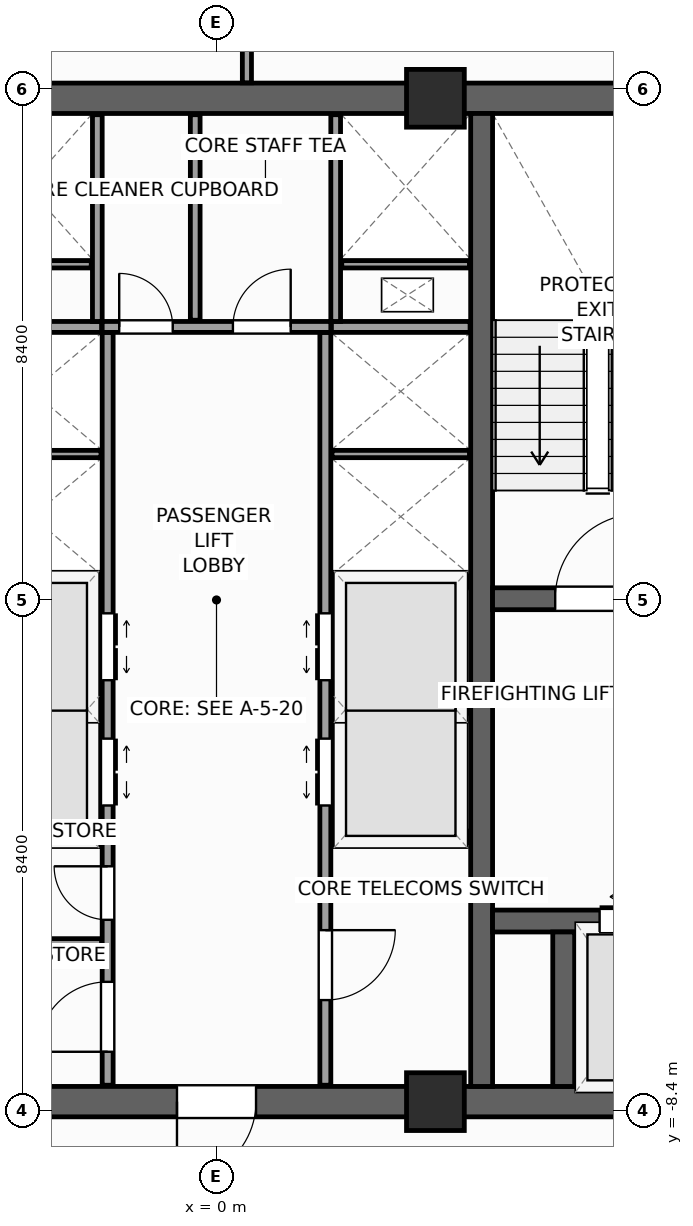
"""IFC4 building model, lengths in metres.
Left out: names, types, materials, properties, quantities, classifications, styles, units other than length and angle.
Written with IfcOpenShell. Run it as: python <this file> out.ifc"""

import sys

from ifc_helpers import new_model, si_unit, direction, frame, frame_2d, origin, origin_2d, place, context, subcontext, project, spatial, rectangle, extrude, source, transform, mapped, element, fill, save


model = new_model("IFC4")
c1 = context("Model", 3, precision=1e-05, world=origin(), true_north=direction((0.0, 1.0)))
c2 = subcontext(c1, "Body", "Model", "MODEL_VIEW")
j1 = project(units=[si_unit("LENGTHUNIT", "METRE"), si_unit("PLANEANGLEUNIT", "RADIAN")], contexts=[c1])
p1 = place(None, origin())
s1 = spatial("IfcSite", under=j1, at=p1, CompositionType="ELEMENT")
p2 = place(p1, origin())
s2 = spatial("IfcBuilding", under=s1, at=p2, CompositionType="ELEMENT")
p3 = place(p2, frame((0.0, 0.0, 209.5)))
s3 = spatial("IfcBuildingStorey", under=s2, at=p3, CompositionType="ELEMENT", Elevation=209.5)
p4 = place(p3, frame((-8.5, -8.25, 0.0), z_axis=(0.0, 0.0, 1.0), x_axis=(1.0, 0.0, 0.0)))
e1 = element("IfcWall", 1, at=p4, inside=s3, PredefinedType="SHEAR", context=c2, shape_type="SweptSolid", body=[
    extrude(rectangle(XDim=17.0, YDim=0.5, at=frame_2d((8.5, 0.0))), origin(), (0.0, 0.0, 1.0), 3.9),
])
p5 = place(p4, frame((7.85, 0.0, 0.0)))
e2 = element("IfcOpeningElement", 2, at=p5, cuts=e1, PredefinedType="OPENING", context=c2, shape_type="SweptSolid", body=[
    extrude(rectangle(XDim=1.3, YDim=2.2, at=frame_2d((0.65, 1.1))), frame((0.0, 0.26, 0.0), z_axis=(0.0, -1.0, 0.0), x_axis=(1.0, 0.0, 0.0)), (0.0, 0.0, 1.0), 0.52),
])
p6 = place(p3, frame((-8.5, 8.25, 0.0), z_axis=(0.0, 0.0, 1.0), x_axis=(1.0, 0.0, 0.0)))
e3 = element("IfcWall", 3, at=p6, inside=s3, PredefinedType="SHEAR", context=c2, shape_type="SweptSolid", body=[
    extrude(rectangle(XDim=17.0, YDim=0.5, at=frame_2d((8.5, 0.0))), origin(), (0.0, 0.0, 1.0), 3.9),
])
p7 = place(p3, frame((4.36, -8.0, 0.0), z_axis=(0.0, 0.0, 1.0), x_axis=(0.0, 1.0, 0.0)))
e4 = element("IfcWall", 4, at=p7, inside=s3, PredefinedType="SHEAR", context=c2, shape_type="SweptSolid", body=[
    extrude(rectangle(XDim=16.0, YDim=0.36, at=frame_2d((8.0, 0.0))), origin(), (0.0, 0.0, 1.0), 3.9),
])
p8 = place(p3, frame((4.54, 0.02, 0.0), z_axis=(0.0, 0.0, 1.0), x_axis=(1.0, 0.0, 0.0)))
e5 = element("IfcWall", 5, at=p8, inside=s3, PredefinedType="SHEAR", context=c2, shape_type="SweptSolid", body=[
    extrude(rectangle(XDim=3.46, YDim=0.36, at=frame_2d((1.73, 0.0))), origin(), (0.0, 0.0, 1.0), 3.9),
])
p9 = place(p8, frame((1.03, 0.0, 0.0)))
e6 = element("IfcOpeningElement", 6, at=p9, cuts=e5, PredefinedType="OPENING", context=c2, shape_type="SweptSolid", body=[
    extrude(rectangle(XDim=1.4, YDim=2.2, at=frame_2d((0.7, 1.1))), frame((0.0, 0.19, 0.0), z_axis=(0.0, -1.0, 0.0), x_axis=(1.0, 0.0, 0.0)), (0.0, 0.0, 1.0), 0.38),
])
p10 = place(p3, frame((4.54, -5.28, 0.0), z_axis=(0.0, 0.0, 1.0), x_axis=(1.0, 0.0, 0.0)))
e7 = element("IfcWall", 7, at=p10, inside=s3, PredefinedType="SHEAR", context=c2, shape_type="SweptSolid", body=[
    extrude(rectangle(XDim=3.46, YDim=0.36, at=frame_2d((1.73, 0.0))), origin(), (0.0, 0.0, 1.0), 3.9),
])
p11 = place(p10, frame((1.76, 0.0, 0.0)))
e8 = element("IfcOpeningElement", 8, at=p11, cuts=e7, PredefinedType="OPENING", context=c2, shape_type="SweptSolid", body=[
    extrude(rectangle(XDim=1.2, YDim=2.25, at=frame_2d((0.6, 1.125))), frame((0.0, 0.19, 0.0), z_axis=(0.0, -1.0, 0.0), x_axis=(1.0, 0.0, 0.0)), (0.0, 0.0, 1.0), 0.38),
])
p12 = place(p3, frame((5.71, -8.0, 0.0), z_axis=(0.0, 0.0, 1.0), x_axis=(0.0, 1.0, 0.0)))
e9 = element("IfcWall", 9, at=p12, inside=s3, PredefinedType="SHEAR", context=c2, shape_type="SweptSolid", body=[
    extrude(rectangle(XDim=2.54, YDim=0.36, at=frame_2d((1.27, 0.0))), origin(), (0.0, 0.0, 1.0), 3.9),
])
m1 = source(origin(), c2, "Body", "SweptSolid", [
    extrude(rectangle(XDim=0.95, YDim=0.95, at=origin_2d()), origin(), (0.0, 0.0, 1.0), 3.9),
])
for number, where, z_axis, x_axis in (
    (10, (3.6, -8.25, 0.0), (0.0, 0.0, 1.0), (1.0, 0.0, 0.0)),
    (11, (3.6, 8.25, 0.0), (0.0, 0.0, 1.0), (1.0, 0.0, 0.0)),
):
    element("IfcColumn", number, at=place(p3, frame(where, z_axis=z_axis, x_axis=x_axis)), inside=s3, PredefinedType="PILASTER", context=c2, shape_type="MappedRepresentation", body=[
        mapped(m1, transform((0.0, 0.0, 0.0), scale=1.0)),
    ])
p13 = place(p3, frame((29.154, 6.733, 0.0), z_axis=(0.0, 0.0, 1.0), x_axis=(-0.77714192302, 0.629325378072, 0.0)))
e12 = element("IfcWall", 12, at=p13, inside=s3, PredefinedType="STANDARD", context=c2, shape_type="SweptSolid", body=[
    extrude(rectangle(XDim=36.84, YDim=0.34, at=frame_2d((18.42, 0.0))), origin(), (0.0, 0.0, 1.0), 2.96),
])
p14 = place(p13, frame((3.721, 0.0, 0.48)))
e13 = element("IfcOpeningElement", 13, at=p14, cuts=e12, PredefinedType="OPENING", context=c2, shape_type="SweptSolid", body=[
    extrude(rectangle(XDim=1.4, YDim=2.4, at=frame_2d((0.7, 1.2))), frame((0.0, 0.18, 0.0), z_axis=(0.0, -1.0, 0.0), x_axis=(1.0, 0.0, 0.0)), (0.0, 0.0, 1.0), 0.36),
])
p15 = place(p13, frame((9.809, 0.0, 0.58)))
e14 = element("IfcOpeningElement", 14, at=p15, cuts=e12, PredefinedType="OPENING", context=c2, shape_type="SweptSolid", body=[
    extrude(rectangle(XDim=1.75, YDim=2.3, at=frame_2d((0.875, 1.15))), frame((0.0, 0.18, 0.0), z_axis=(0.0, -1.0, 0.0), x_axis=(1.0, 0.0, 0.0)), (0.0, 0.0, 1.0), 0.36),
])
p16 = place(p13, frame((16.058, 0.0, 0.58)))
e15 = element("IfcOpeningElement", 15, at=p16, cuts=e12, PredefinedType="OPENING", context=c2, shape_type="SweptSolid", body=[
    extrude(rectangle(XDim=1.75, YDim=2.3, at=frame_2d((0.875, 1.15))), frame((0.0, 0.18, 0.0), z_axis=(0.0, -1.0, 0.0), x_axis=(1.0, 0.0, 0.0)), (0.0, 0.0, 1.0), 0.36),
])
p17 = place(p13, frame((24.176, 0.0, 0.58)))
e16 = element("IfcOpeningElement", 16, at=p17, cuts=e12, PredefinedType="OPENING", context=c2, shape_type="SweptSolid", body=[
    extrude(rectangle(XDim=1.75, YDim=2.3, at=frame_2d((0.875, 1.15))), frame((0.0, 0.18, 0.0), z_axis=(0.0, -1.0, 0.0), x_axis=(1.0, 0.0, 0.0)), (0.0, 0.0, 1.0), 0.36),
])
p18 = place(p13, frame((30.982, 0.0, 0.48)))
e17 = element("IfcOpeningElement", 17, at=p18, cuts=e12, PredefinedType="OPENING", context=c2, shape_type="SweptSolid", body=[
    extrude(rectangle(XDim=1.4, YDim=2.4, at=frame_2d((0.7, 1.2))), frame((0.0, 0.18, 0.0), z_axis=(0.0, -1.0, 0.0), x_axis=(1.0, 0.0, 0.0)), (0.0, 0.0, 1.0), 0.36),
])
p19 = place(p3, frame((-29.154, -6.733, 0.0), z_axis=(0.0, 0.0, 1.0), x_axis=(0.77714192302, -0.629325378072, 0.0)))
e18 = element("IfcWall", 18, at=p19, inside=s3, PredefinedType="STANDARD", context=c2, shape_type="SweptSolid", body=[
    extrude(rectangle(XDim=36.84, YDim=0.34, at=frame_2d((18.42, 0.0))), origin(), (0.0, 0.0, 1.0), 2.96),
])
p20 = place(p19, frame((3.721, 0.0, 0.48)))
e19 = element("IfcOpeningElement", 19, at=p20, cuts=e18, PredefinedType="OPENING", context=c2, shape_type="SweptSolid", body=[
    extrude(rectangle(XDim=1.4, YDim=2.4, at=frame_2d((0.7, 1.2))), frame((0.0, 0.18, 0.0), z_axis=(0.0, -1.0, 0.0), x_axis=(1.0, 0.0, 0.0)), (0.0, 0.0, 1.0), 0.36),
])
p21 = place(p19, frame((9.809, 0.0, 0.58)))
e20 = element("IfcOpeningElement", 20, at=p21, cuts=e18, PredefinedType="OPENING", context=c2, shape_type="SweptSolid", body=[
    extrude(rectangle(XDim=1.75, YDim=2.3, at=frame_2d((0.875, 1.15))), frame((0.0, 0.18, 0.0), z_axis=(0.0, -1.0, 0.0), x_axis=(1.0, 0.0, 0.0)), (0.0, 0.0, 1.0), 0.36),
])
p22 = place(p19, frame((16.058, 0.0, 0.58)))
e21 = element("IfcOpeningElement", 21, at=p22, cuts=e18, PredefinedType="OPENING", context=c2, shape_type="SweptSolid", body=[
    extrude(rectangle(XDim=1.75, YDim=2.3, at=frame_2d((0.875, 1.15))), frame((0.0, 0.18, 0.0), z_axis=(0.0, -1.0, 0.0), x_axis=(1.0, 0.0, 0.0)), (0.0, 0.0, 1.0), 0.36),
])
p23 = place(p19, frame((24.176, 0.0, 0.58)))
e22 = element("IfcOpeningElement", 22, at=p23, cuts=e18, PredefinedType="OPENING", context=c2, shape_type="SweptSolid", body=[
    extrude(rectangle(XDim=1.75, YDim=2.3, at=frame_2d((0.875, 1.15))), frame((0.0, 0.18, 0.0), z_axis=(0.0, -1.0, 0.0), x_axis=(1.0, 0.0, 0.0)), (0.0, 0.0, 1.0), 0.36),
])
p24 = place(p19, frame((30.982, 0.0, 0.48)))
e23 = element("IfcOpeningElement", 23, at=p24, cuts=e18, PredefinedType="OPENING", context=c2, shape_type="SweptSolid", body=[
    extrude(rectangle(XDim=1.4, YDim=2.4, at=frame_2d((0.7, 1.2))), frame((0.0, 0.18, 0.0), z_axis=(0.0, -1.0, 0.0), x_axis=(1.0, 0.0, 0.0)), (0.0, 0.0, 1.0), 0.36),
])
p25 = place(p3, frame((-1.79, -7.98, 0.0), z_axis=(0.0, 0.0, 1.0), x_axis=(0.0, 1.0, 0.0)))
e24 = element("IfcWall", 24, at=p25, inside=s3, PredefinedType="PARTITIONING", context=c2, shape_type="SweptSolid", body=[
    extrude(rectangle(XDim=12.38, YDim=0.18, at=frame_2d((6.19, 0.0))), origin(), (0.0, 0.0, 1.0), 3.66),
])
p26 = place(p25, frame((4.6, 0.0, 0.0)))
e25 = element("IfcOpeningElement", 25, at=p26, cuts=e24, PredefinedType="OPENING", context=c2, shape_type="SweptSolid", body=[
    extrude(rectangle(XDim=1.1, YDim=2.2, at=frame_2d((0.55, 1.1))), frame((0.0, 0.1, 0.0), z_axis=(0.0, -1.0, 0.0), x_axis=(1.0, 0.0, 0.0)), (0.0, 0.0, 1.0), 0.2),
])
p27 = place(p25, frame((6.66, 0.0, 0.0)))
e26 = element("IfcOpeningElement", 26, at=p27, cuts=e24, PredefinedType="OPENING", context=c2, shape_type="SweptSolid", body=[
    extrude(rectangle(XDim=1.1, YDim=2.2, at=frame_2d((0.55, 1.1))), frame((0.0, 0.1, 0.0), z_axis=(0.0, -1.0, 0.0), x_axis=(1.0, 0.0, 0.0)), (0.0, 0.0, 1.0), 0.2),
])
p28 = place(p25, frame((0.55, 0.0, 0.0)))
e27 = element("IfcOpeningElement", 27, at=p28, cuts=e24, PredefinedType="OPENING", context=c2, shape_type="SweptSolid", body=[
    extrude(rectangle(XDim=1.15, YDim=2.25, at=frame_2d((0.575, 1.125))), frame((0.0, 0.1, 0.0), z_axis=(0.0, -1.0, 0.0), x_axis=(1.0, 0.0, 0.0)), (0.0, 0.0, 1.0), 0.2),
])
p29 = place(p25, frame((2.72, 0.0, 0.0)))
e28 = element("IfcOpeningElement", 28, at=p29, cuts=e24, PredefinedType="OPENING", context=c2, shape_type="SweptSolid", body=[
    extrude(rectangle(XDim=0.88, YDim=2.1, at=frame_2d((0.44, 1.05))), frame((0.0, 0.1, 0.0), z_axis=(0.0, -1.0, 0.0), x_axis=(1.0, 0.0, 0.0)), (0.0, 0.0, 1.0), 0.2),
])
p30 = place(p3, frame((1.79, -7.98, 0.0), z_axis=(0.0, 0.0, 1.0), x_axis=(0.0, 1.0, 0.0)))
e29 = element("IfcWall", 29, at=p30, inside=s3, PredefinedType="PARTITIONING", context=c2, shape_type="SweptSolid", body=[
    extrude(rectangle(XDim=12.38, YDim=0.18, at=frame_2d((6.19, 0.0))), origin(), (0.0, 0.0, 1.0), 3.66),
])
p31 = place(p30, frame((4.6, 0.0, 0.0)))
e30 = element("IfcOpeningElement", 30, at=p31, cuts=e29, PredefinedType="OPENING", context=c2, shape_type="SweptSolid", body=[
    extrude(rectangle(XDim=1.1, YDim=2.2, at=frame_2d((0.55, 1.1))), frame((0.0, 0.1, 0.0), z_axis=(0.0, -1.0, 0.0), x_axis=(1.0, 0.0, 0.0)), (0.0, 0.0, 1.0), 0.2),
])
p32 = place(p30, frame((6.66, 0.0, 0.0)))
e31 = element("IfcOpeningElement", 31, at=p32, cuts=e29, PredefinedType="OPENING", context=c2, shape_type="SweptSolid", body=[
    extrude(rectangle(XDim=1.1, YDim=2.2, at=frame_2d((0.55, 1.1))), frame((0.0, 0.1, 0.0), z_axis=(0.0, -1.0, 0.0), x_axis=(1.0, 0.0, 0.0)), (0.0, 0.0, 1.0), 0.2),
])
p33 = place(p30, frame((1.4, 0.0, 0.0)))
e32 = element("IfcOpeningElement", 32, at=p33, cuts=e29, PredefinedType="OPENING", context=c2, shape_type="SweptSolid", body=[
    extrude(rectangle(XDim=1.15, YDim=2.25, at=frame_2d((0.575, 1.125))), frame((0.0, 0.1, 0.0), z_axis=(0.0, -1.0, 0.0), x_axis=(1.0, 0.0, 0.0)), (0.0, 0.0, 1.0), 0.2),
])
p34 = place(p3, frame((-1.88, 4.49, 0.0), z_axis=(0.0, 0.0, 1.0), x_axis=(1.0, 0.0, 0.0)))
e33 = element("IfcWall", 33, at=p34, inside=s3, PredefinedType="PARTITIONING", context=c2, shape_type="SweptSolid", body=[
    extrude(rectangle(XDim=3.76, YDim=0.18, at=frame_2d((1.88, 0.0))), origin(), (0.0, 0.0, 1.0), 3.66),
])
p35 = place(p34, frame((0.28, 0.0, 0.0)))
e34 = element("IfcOpeningElement", 34, at=p35, cuts=e33, PredefinedType="OPENING", context=c2, shape_type="SweptSolid", body=[
    extrude(rectangle(XDim=0.88, YDim=2.1, at=frame_2d((0.44, 1.05))), frame((0.0, 0.1, 0.0), z_axis=(0.0, -1.0, 0.0), x_axis=(1.0, 0.0, 0.0)), (0.0, 0.0, 1.0), 0.2),
])
p36 = place(p34, frame((2.15, 0.0, 0.0)))
e35 = element("IfcOpeningElement", 35, at=p36, cuts=e33, PredefinedType="OPENING", context=c2, shape_type="SweptSolid", body=[
    extrude(rectangle(XDim=0.95, YDim=2.1, at=frame_2d((0.475, 1.05))), frame((0.0, 0.1, 0.0), z_axis=(0.0, -1.0, 0.0), x_axis=(1.0, 0.0, 0.0)), (0.0, 0.0, 1.0), 0.2),
])
for number, where, z_axis, x_axis in (
    (36, (-4.17, -3.9, 0.0), (0.0, 0.0, 1.0), (1.0, 0.0, 0.0)),
    (37, (1.89, -3.9, 0.0), (0.0, 0.0, 1.0), (1.0, 0.0, 0.0)),
    (38, (-4.17, 0.3, 0.0), (0.0, 0.0, 1.0), (1.0, 0.0, 0.0)),
    (39, (1.89, 0.3, 0.0), (0.0, 0.0, 1.0), (1.0, 0.0, 0.0)),
    (40, (-4.17, 4.49, 0.0), (0.0, 0.0, 1.0), (1.0, 0.0, 0.0)),
    (41, (1.89, 4.49, 0.0), (0.0, 0.0, 1.0), (1.0, 0.0, 0.0)),
):
    element("IfcWall", number, at=place(p3, frame(where, z_axis=z_axis, x_axis=x_axis)), inside=s3, PredefinedType="PARTITIONING", context=c2, shape_type="SweptSolid", body=[
        extrude(rectangle(XDim=2.28, YDim=0.18, at=frame_2d((1.14, 0.0))), origin(), (0.0, 0.0, 1.0), 3.66),
    ])
for number, where, z_axis, x_axis in (
    (42, (-4.16, -1.8, 0.0), (0.0, 0.0, 1.0), (1.0, 0.0, 0.0)),
    (43, (1.9, -1.8, 0.0), (0.0, 0.0, 1.0), (1.0, 0.0, 0.0)),
    (44, (-4.16, 2.4, 0.0), (0.0, 0.0, 1.0), (1.0, 0.0, 0.0)),
    (45, (1.9, 2.4, 0.0), (0.0, 0.0, 1.0), (1.0, 0.0, 0.0)),
):
    element("IfcWall", number, at=place(p3, frame(where, z_axis=z_axis, x_axis=x_axis)), inside=s3, PredefinedType="PARTITIONING", context=c2, shape_type="SweptSolid", body=[
        extrude(rectangle(XDim=2.26, YDim=0.12, at=frame_2d((1.13, 0.0))), origin(), (0.0, 0.0, 1.0), 3.66),
    ])
p37 = place(p3, frame((-4.17, -5.65, 0.0), z_axis=(0.0, 0.0, 1.0), x_axis=(1.0, 0.0, 0.0)))
e46 = element("IfcWall", 46, at=p37, inside=s3, PredefinedType="PARTITIONING", context=c2, shape_type="SweptSolid", body=[
    extrude(rectangle(XDim=2.28, YDim=0.16, at=frame_2d((1.14, 0.0))), origin(), (0.0, 0.0, 1.0), 3.66),
])
for number, where, z_axis, x_axis in (
    (47, (-1.96, 4.58, 0.0), (0.0, 0.0, 1.0), (0.0, 1.0, 0.0)),
    (48, (1.96, 4.58, 0.0), (0.0, 0.0, 1.0), (0.0, 1.0, 0.0)),
):
    element("IfcWall", number, at=place(p3, frame(where, z_axis=z_axis, x_axis=x_axis)), inside=s3, PredefinedType="PARTITIONING", context=c2, shape_type="SweptSolid", body=[
        extrude(rectangle(XDim=3.4, YDim=0.16, at=frame_2d((1.7, 0.0))), origin(), (0.0, 0.0, 1.0), 3.66),
    ])
for number, where, z_axis, x_axis in (
    (49, (-4.16, 5.52, 0.0), (0.0, 0.0, 1.0), (1.0, 0.0, 0.0)),
    (50, (2.06, 5.52, 0.0), (0.0, 0.0, 1.0), (1.0, 0.0, 0.0)),
):
    element("IfcWall", number, at=place(p3, frame(where, z_axis=z_axis, x_axis=x_axis)), inside=s3, PredefinedType="PARTITIONING", context=c2, shape_type="SweptSolid", body=[
        extrude(rectangle(XDim=2.1, YDim=0.12, at=frame_2d((1.05, 0.0))), origin(), (0.0, 0.0, 1.0), 3.66),
    ])
p38 = place(p3, frame((-0.35, 4.6, 0.0), z_axis=(0.0, 0.0, 1.0), x_axis=(0.0, 1.0, 0.0)))
e51 = element("IfcWall", 51, at=p38, inside=s3, PredefinedType="PARTITIONING", context=c2, shape_type="SweptSolid", body=[
    extrude(rectangle(XDim=3.38, YDim=0.16, at=frame_2d((1.69, 0.0))), origin(), (0.0, 0.0, 1.0), 3.66),
])
p39 = place(p3, frame((0.5, 8.505, 0.0), z_axis=(0.0, 0.0, 1.0), x_axis=(0.0, 1.0, 0.0)))
e52 = element("IfcWall", 52, at=p39, inside=s3, PredefinedType="PARTITIONING", context=c2, shape_type="SweptSolid", body=[
    extrude(rectangle(XDim=20.675, YDim=0.15, at=frame_2d((10.337, 0.0))), origin(), (0.0, 0.0, 1.0), 3.66),
])
m2 = source(origin(), c2, "Body", "SweptSolid", [
    extrude(rectangle(XDim=1.4, YDim=2.2, at=frame_2d((0.7, 1.1))), frame((0.0, 0.025, 0.0), z_axis=(0.0, -1.0, 0.0), x_axis=(1.0, 0.0, 0.0)), (0.0, 0.0, 1.0), 0.05),
])
p40 = place(p9, origin())
e53 = element("IfcDoor", 53, at=p40, inside=s3, OperationType="SINGLE_SWING_RIGHT", PredefinedType="DOOR", context=c2, shape_type="MappedRepresentation", body=[
    mapped(m2, transform((0.0, 0.0, 0.0), scale=1.0)),
])
fill(e6, e53)
m3 = source(origin(), c2, "Body", "SweptSolid", [
    extrude(rectangle(XDim=1.3, YDim=2.2, at=frame_2d((0.65, 1.1))), frame((0.0, 0.025, 0.0), z_axis=(0.0, -1.0, 0.0), x_axis=(1.0, 0.0, 0.0)), (0.0, 0.0, 1.0), 0.05),
])
p41 = place(p5, frame((1.3, 0.0, 0.0), z_axis=(0.0, 0.0, 1.0), x_axis=(-1.0, 0.0, 0.0)))
e54 = element("IfcDoor", 54, at=p41, inside=s3, OperationType="SINGLE_SWING_LEFT", PredefinedType="DOOR", context=c2, shape_type="MappedRepresentation", body=[
    mapped(m3, transform((0.0, 0.0, 0.0), scale=1.0)),
])
fill(e2, e54)
m4 = source(origin(), c2, "Body", "SweptSolid", [
    extrude(rectangle(XDim=1.2, YDim=2.25, at=frame_2d((0.6, 1.125))), frame((0.0, 0.025, 0.0), z_axis=(0.0, -1.0, 0.0), x_axis=(1.0, 0.0, 0.0)), (0.0, 0.0, 1.0), 0.05),
])
p42 = place(p11, origin())
e55 = element("IfcDoor", 55, at=p42, inside=s3, OperationType="DOUBLE_DOOR_SLIDING", PredefinedType="DOOR", context=c2, shape_type="MappedRepresentation", body=[
    mapped(m4, transform((0.0, 0.0, 0.0), scale=1.0)),
])
fill(e8, e55)
m5 = source(origin(), c2, "Body", "SweptSolid", [
    extrude(rectangle(XDim=1.1, YDim=2.2, at=frame_2d((0.55, 1.1))), frame((0.0, 0.025, 0.0), z_axis=(0.0, -1.0, 0.0), x_axis=(1.0, 0.0, 0.0)), (0.0, 0.0, 1.0), 0.05),
])
p43 = place(p26, frame((1.1, 0.0, 0.0), z_axis=(0.0, 0.0, 1.0), x_axis=(-1.0, 0.0, 0.0)))
e56 = element("IfcDoor", 56, at=p43, inside=s3, OperationType="DOUBLE_DOOR_SLIDING", PredefinedType="DOOR", context=c2, shape_type="MappedRepresentation", body=[
    mapped(m5, transform((0.0, 0.0, 0.0), scale=1.0)),
])
fill(e25, e56)
p44 = place(p27, frame((1.1, 0.0, 0.0), z_axis=(0.0, 0.0, 1.0), x_axis=(-1.0, 0.0, 0.0)))
e57 = element("IfcDoor", 57, at=p44, inside=s3, OperationType="DOUBLE_DOOR_SLIDING", PredefinedType="DOOR", context=c2, shape_type="MappedRepresentation", body=[
    mapped(m5, transform((0.0, 0.0, 0.0), scale=1.0)),
])
fill(e26, e57)
p45 = place(p31, origin())
e58 = element("IfcDoor", 58, at=p45, inside=s3, OperationType="DOUBLE_DOOR_SLIDING", PredefinedType="DOOR", context=c2, shape_type="MappedRepresentation", body=[
    mapped(m5, transform((0.0, 0.0, 0.0), scale=1.0)),
])
fill(e30, e58)
p46 = place(p32, origin())
e59 = element("IfcDoor", 59, at=p46, inside=s3, OperationType="DOUBLE_DOOR_SLIDING", PredefinedType="DOOR", context=c2, shape_type="MappedRepresentation", body=[
    mapped(m5, transform((0.0, 0.0, 0.0), scale=1.0)),
])
fill(e31, e59)
m6 = source(origin(), c2, "Body", "SweptSolid", [
    extrude(rectangle(XDim=1.15, YDim=2.25, at=frame_2d((0.575, 1.125))), frame((0.0, 0.025, 0.0), z_axis=(0.0, -1.0, 0.0), x_axis=(1.0, 0.0, 0.0)), (0.0, 0.0, 1.0), 0.05),
])
p47 = place(p28, origin())
e60 = element("IfcDoor", 60, at=p47, inside=s3, OperationType="SINGLE_SWING_LEFT", PredefinedType="DOOR", context=c2, shape_type="MappedRepresentation", body=[
    mapped(m6, transform((0.0, 0.0, 0.0), scale=1.0)),
])
fill(e27, e60)
m7 = source(origin(), c2, "Body", "SweptSolid", [
    extrude(rectangle(XDim=0.88, YDim=2.1, at=frame_2d((0.44, 1.05))), frame((0.0, 0.025, 0.0), z_axis=(0.0, -1.0, 0.0), x_axis=(1.0, 0.0, 0.0)), (0.0, 0.0, 1.0), 0.05),
])
p48 = place(p29, origin())
e61 = element("IfcDoor", 61, at=p48, inside=s3, OperationType="SINGLE_SWING_RIGHT", PredefinedType="DOOR", context=c2, shape_type="MappedRepresentation", body=[
    mapped(m7, transform((0.0, 0.0, 0.0), scale=1.0)),
])
fill(e28, e61)
p49 = place(p33, frame((1.15, 0.0, 0.0), z_axis=(0.0, 0.0, 1.0), x_axis=(-1.0, 0.0, 0.0)))
e62 = element("IfcDoor", 62, at=p49, inside=s3, OperationType="SINGLE_SWING_RIGHT", PredefinedType="DOOR", context=c2, shape_type="MappedRepresentation", body=[
    mapped(m6, transform((0.0, 0.0, 0.0), scale=1.0)),
])
fill(e32, e62)
p50 = place(p35, origin())
e63 = element("IfcDoor", 63, at=p50, inside=s3, OperationType="SINGLE_SWING_LEFT", PredefinedType="DOOR", context=c2, shape_type="MappedRepresentation", body=[
    mapped(m7, transform((0.0, 0.0, 0.0), scale=1.0)),
])
fill(e34, e63)
m8 = source(origin(), c2, "Body", "SweptSolid", [
    extrude(rectangle(XDim=0.95, YDim=2.1, at=frame_2d((0.475, 1.05))), frame((0.0, 0.025, 0.0), z_axis=(0.0, -1.0, 0.0), x_axis=(1.0, 0.0, 0.0)), (0.0, 0.0, 1.0), 0.05),
])
p51 = place(p36, origin())
e64 = element("IfcDoor", 64, at=p51, inside=s3, OperationType="SINGLE_SWING_RIGHT", PredefinedType="DOOR", context=c2, shape_type="MappedRepresentation", body=[
    mapped(m8, transform((0.0, 0.0, 0.0), scale=1.0)),
])
fill(e35, e64)
save(model, sys.argv[1])
